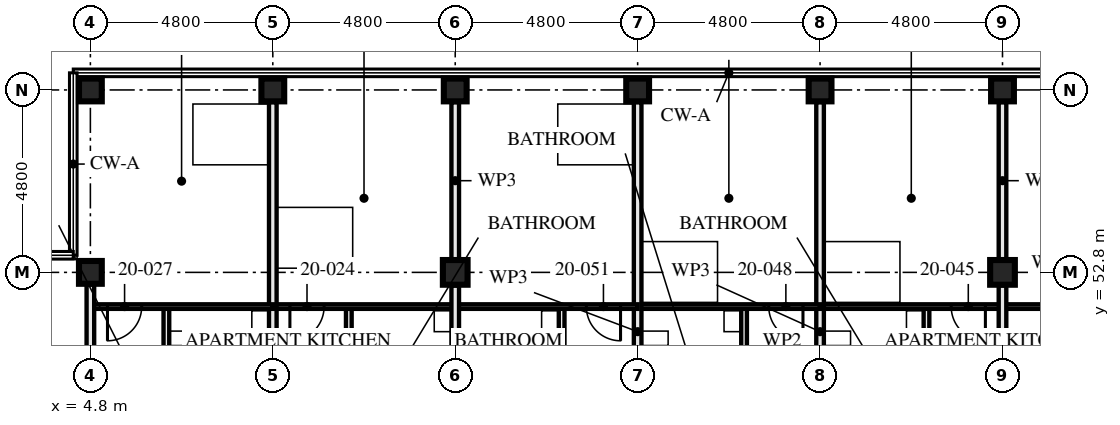
"""IFC4 building model, lengths in metres.
Left out: names, types, materials, properties, quantities, classifications, styles, units other than length and angle.
Written with IfcOpenShell. Run it as: python <this file> out.ifc"""

import sys

from ifc_helpers import new_model, si_unit, direction, frame, frame_2d, origin, origin_2d, place, context, subcontext, project, spatial, rectangle, hollow_rectangle, extrude, element, fill, save


model = new_model("IFC4")
c1 = context("Model", 3, precision=1e-05, world=origin(), true_north=direction((0.0, 1.0)))
c2 = subcontext(c1, "Body", "Model", "MODEL_VIEW")
j1 = project(units=[si_unit("LENGTHUNIT", "METRE"), si_unit("PLANEANGLEUNIT", "RADIAN")], contexts=[c1])
p1 = place(None, origin())
s1 = spatial("IfcSite", under=j1, at=p1, CompositionType="ELEMENT")
p2 = place(p1, origin())
s2 = spatial("IfcBuilding", under=s1, at=p2, CompositionType="ELEMENT")
p3 = place(p2, frame((0.0, 0.0, 76.0)))
s3 = spatial("IfcBuildingStorey", under=s2, at=p3, CompositionType="ELEMENT", Elevation=76.0)
for number, where, z_axis, x_axis in (
    (1, (4.8, 52.8, 0.0), (0.0, 0.0, 1.0), (0.0, 1.0, 0.0)),
    (2, (4.8, 57.6, 0.0), (0.0, 0.0, 1.0), (0.0, 1.0, 0.0)),
    (3, (9.6, 57.6, 0.0), (0.0, 0.0, 1.0), (0.0, 1.0, 0.0)),
):
    element("IfcColumn", number, at=place(p3, frame(where, z_axis=z_axis, x_axis=x_axis)), inside=s3, PredefinedType="COLUMN", context=c2, shape_type="SweptSolid", body=[
        extrude(hollow_rectangle(XDim=0.6, YDim=0.6, WallThickness=0.08, at=origin_2d()), origin(), (0.0, 0.0, 1.0), 3.5),
    ])
p4 = place(p3, frame((14.4, 52.8, 0.0), z_axis=(0.0, 0.0, 1.0), x_axis=(1.0, 0.0, 0.0)))
e4 = element("IfcColumn", 4, at=p4, inside=s3, PredefinedType="COLUMN", context=c2, shape_type="SweptSolid", body=[
    extrude(hollow_rectangle(XDim=0.65, YDim=0.65, WallThickness=0.05, at=origin_2d()), origin(), (0.0, 0.0, 1.0), 3.5),
])
for number, where, z_axis, x_axis in (
    (5, (14.4, 57.6, 0.0), (0.0, 0.0, 1.0), (0.0, 1.0, 0.0)),
    (6, (19.2, 57.6, 0.0), (0.0, 0.0, 1.0), (0.0, 1.0, 0.0)),
    (7, (24.0, 57.6, 0.0), (0.0, 0.0, 1.0), (0.0, 1.0, 0.0)),
):
    element("IfcColumn", number, at=place(p3, frame(where, z_axis=z_axis, x_axis=x_axis)), inside=s3, PredefinedType="COLUMN", context=c2, shape_type="SweptSolid", body=[
        extrude(hollow_rectangle(XDim=0.6, YDim=0.6, WallThickness=0.08, at=origin_2d()), origin(), (0.0, 0.0, 1.0), 3.5),
    ])
p5 = place(p3, frame((28.8, 52.8, 0.0), z_axis=(0.0, 0.0, 1.0), x_axis=(1.0, 0.0, 0.0)))
e8 = element("IfcColumn", 8, at=p5, inside=s3, PredefinedType="COLUMN", context=c2, shape_type="SweptSolid", body=[
    extrude(hollow_rectangle(XDim=0.65, YDim=0.65, WallThickness=0.05, at=origin_2d()), origin(), (0.0, 0.0, 1.0), 3.5),
])
p6 = place(p3, frame((28.8, 57.6, 0.0), z_axis=(0.0, 0.0, 1.0), x_axis=(0.0, 1.0, 0.0)))
e9 = element("IfcColumn", 9, at=p6, inside=s3, PredefinedType="COLUMN", context=c2, shape_type="SweptSolid", body=[
    extrude(hollow_rectangle(XDim=0.6, YDim=0.6, WallThickness=0.08, at=origin_2d()), origin(), (0.0, 0.0, 1.0), 3.5),
])
p7 = place(p3, frame((11.6, 51.9, 0.0), z_axis=(0.0, 0.0, 1.0), x_axis=(0.0, -1.0, 0.0)))
e10 = element("IfcWall", 10, at=p7, inside=s3, PredefinedType="PARTITIONING", context=c2, shape_type="SweptSolid", body=[
    extrude(rectangle(XDim=3.0, YDim=0.15, at=frame_2d((1.5, 0.0))), origin(), (0.0, 0.0, 1.0), 3.25),
])
p8 = place(p3, frame((14.4, 51.9, 0.0), z_axis=(0.0, 0.0, 1.0), x_axis=(-1.0, 0.0, 0.0)))
e11 = element("IfcWall", 11, at=p8, inside=s3, PredefinedType="PARTITIONING", context=c2, shape_type="SweptSolid", body=[
    extrude(rectangle(XDim=4.8, YDim=0.12, at=frame_2d((2.4, 0.0))), origin(), (0.0, 0.0, 1.0), 3.25),
])
p9 = place(p8, frame((3.45, 0.0, 0.0)))
e12 = element("IfcOpeningElement", 12, at=p9, cuts=e11, PredefinedType="OPENING", context=c2, shape_type="SweptSolid", body=[
    extrude(rectangle(XDim=0.9, YDim=2.1, at=frame_2d((0.45, 1.05))), frame((0.0, 0.071, 0.0), z_axis=(0.0, -1.0, 0.0), x_axis=(1.0, 0.0, 0.0)), (0.0, 0.0, 1.0), 0.141),
])
p10 = place(p3, frame((9.6, 57.28, 0.0), z_axis=(0.0, 0.0, 1.0), x_axis=(0.0, -1.0, 0.0)))
e13 = element("IfcWall", 13, at=p10, inside=s3, PredefinedType="PARTITIONING", context=c2, shape_type="SweptSolid", body=[
    extrude(rectangle(XDim=12.08, YDim=0.2, at=frame_2d((6.04, 0.0))), origin(), (0.0, 0.0, 1.0), 2.04),
])
p11 = place(p3, frame((6.8, 51.9, 0.0), z_axis=(0.0, 0.0, 1.0), x_axis=(0.0, -1.0, 0.0)))
e14 = element("IfcWall", 14, at=p11, inside=s3, PredefinedType="PARTITIONING", context=c2, shape_type="SweptSolid", body=[
    extrude(rectangle(XDim=3.0, YDim=0.15, at=frame_2d((1.5, 0.0))), origin(), (0.0, 0.0, 1.0), 3.25),
])
p12 = place(p3, frame((9.6, 51.9, 0.0), z_axis=(0.0, 0.0, 1.0), x_axis=(-1.0, 0.0, 0.0)))
e15 = element("IfcWall", 15, at=p12, inside=s3, PredefinedType="PARTITIONING", context=c2, shape_type="SweptSolid", body=[
    extrude(rectangle(XDim=4.8, YDim=0.12, at=frame_2d((2.4, 0.0))), origin(), (0.0, 0.0, 1.0), 3.25),
])
p13 = place(p12, frame((3.45, 0.0, 0.0)))
e16 = element("IfcOpeningElement", 16, at=p13, cuts=e15, PredefinedType="OPENING", context=c2, shape_type="SweptSolid", body=[
    extrude(rectangle(XDim=0.9, YDim=2.1, at=frame_2d((0.45, 1.05))), frame((0.0, 0.071, 0.0), z_axis=(0.0, -1.0, 0.0), x_axis=(1.0, 0.0, 0.0)), (0.0, 0.0, 1.0), 0.141),
])
p14 = place(p3, frame((4.8, 52.48, 0.0), z_axis=(0.0, 0.0, 1.0), x_axis=(0.0, -1.0, 0.0)))
e17 = element("IfcWall", 17, at=p14, inside=s3, PredefinedType="PARTITIONING", context=c2, shape_type="SweptSolid", body=[
    extrude(rectangle(XDim=7.28, YDim=0.2, at=frame_2d((3.64, 0.0))), origin(), (0.0, 0.0, 1.0), 2.04),
])
p15 = place(p3, frame((26.8, 51.9, 0.0), z_axis=(0.0, 0.0, 1.0), x_axis=(0.0, -1.0, 0.0)))
e18 = element("IfcWall", 18, at=p15, inside=s3, PredefinedType="PARTITIONING", context=c2, shape_type="SweptSolid", body=[
    extrude(rectangle(XDim=3.0, YDim=0.15, at=frame_2d((1.5, 0.0))), origin(), (0.0, 0.0, 1.0), 3.25),
])
p16 = place(p3, frame((28.8, 51.9, 0.0), z_axis=(0.0, 0.0, 1.0), x_axis=(-1.0, 0.0, 0.0)))
e19 = element("IfcWall", 19, at=p16, inside=s3, PredefinedType="PARTITIONING", context=c2, shape_type="SweptSolid", body=[
    extrude(rectangle(XDim=4.8, YDim=0.12, at=frame_2d((2.4, 0.0))), origin(), (0.0, 0.0, 1.0), 3.25),
])
p17 = place(p16, frame((0.45, 0.0, 0.0)))
e20 = element("IfcOpeningElement", 20, at=p17, cuts=e19, PredefinedType="OPENING", context=c2, shape_type="SweptSolid", body=[
    extrude(rectangle(XDim=0.9, YDim=2.1, at=frame_2d((0.45, 1.05))), frame((0.0, 0.071, 0.0), z_axis=(0.0, -1.0, 0.0), x_axis=(1.0, 0.0, 0.0)), (0.0, 0.0, 1.0), 0.141),
])
p18 = place(p3, frame((24.0, 57.28, 0.0), z_axis=(0.0, 0.0, 1.0), x_axis=(0.0, -1.0, 0.0)))
e21 = element("IfcWall", 21, at=p18, inside=s3, PredefinedType="PARTITIONING", context=c2, shape_type="SweptSolid", body=[
    extrude(rectangle(XDim=12.08, YDim=0.2, at=frame_2d((6.04, 0.0))), origin(), (0.0, 0.0, 1.0), 2.04),
])
p19 = place(p3, frame((22.0, 51.9, 0.0), z_axis=(0.0, 0.0, 1.0), x_axis=(0.0, -1.0, 0.0)))
e22 = element("IfcWall", 22, at=p19, inside=s3, PredefinedType="PARTITIONING", context=c2, shape_type="SweptSolid", body=[
    extrude(rectangle(XDim=3.0, YDim=0.15, at=frame_2d((1.5, 0.0))), origin(), (0.0, 0.0, 1.0), 3.25),
])
p20 = place(p3, frame((24.0, 51.9, 0.0), z_axis=(0.0, 0.0, 1.0), x_axis=(-1.0, 0.0, 0.0)))
e23 = element("IfcWall", 23, at=p20, inside=s3, PredefinedType="PARTITIONING", context=c2, shape_type="SweptSolid", body=[
    extrude(rectangle(XDim=4.8, YDim=0.12, at=frame_2d((2.4, 0.0))), origin(), (0.0, 0.0, 1.0), 3.25),
])
p21 = place(p20, frame((0.45, 0.0, 0.0)))
e24 = element("IfcOpeningElement", 24, at=p21, cuts=e23, PredefinedType="OPENING", context=c2, shape_type="SweptSolid", body=[
    extrude(rectangle(XDim=0.9, YDim=2.1, at=frame_2d((0.45, 1.05))), frame((0.0, 0.071, 0.0), z_axis=(0.0, -1.0, 0.0), x_axis=(1.0, 0.0, 0.0)), (0.0, 0.0, 1.0), 0.141),
])
p22 = place(p3, frame((19.2, 57.28, 0.0), z_axis=(0.0, 0.0, 1.0), x_axis=(0.0, -1.0, 0.0)))
e25 = element("IfcWall", 25, at=p22, inside=s3, PredefinedType="PARTITIONING", context=c2, shape_type="SweptSolid", body=[
    extrude(rectangle(XDim=12.08, YDim=0.2, at=frame_2d((6.04, 0.0))), origin(), (0.0, 0.0, 1.0), 2.04),
])
p23 = place(p3, frame((17.2, 51.9, 0.0), z_axis=(0.0, 0.0, 1.0), x_axis=(0.0, -1.0, 0.0)))
e26 = element("IfcWall", 26, at=p23, inside=s3, PredefinedType="PARTITIONING", context=c2, shape_type="SweptSolid", body=[
    extrude(rectangle(XDim=3.0, YDim=0.15, at=frame_2d((1.5, 0.0))), origin(), (0.0, 0.0, 1.0), 3.25),
])
p24 = place(p3, frame((19.2, 51.9, 0.0), z_axis=(0.0, 0.0, 1.0), x_axis=(-1.0, 0.0, 0.0)))
e27 = element("IfcWall", 27, at=p24, inside=s3, PredefinedType="PARTITIONING", context=c2, shape_type="SweptSolid", body=[
    extrude(rectangle(XDim=4.8, YDim=0.12, at=frame_2d((2.4, 0.0))), origin(), (0.0, 0.0, 1.0), 3.25),
])
p25 = place(p24, frame((0.45, 0.0, 0.0)))
e28 = element("IfcOpeningElement", 28, at=p25, cuts=e27, PredefinedType="OPENING", context=c2, shape_type="SweptSolid", body=[
    extrude(rectangle(XDim=0.9, YDim=2.1, at=frame_2d((0.45, 1.05))), frame((0.0, 0.071, 0.0), z_axis=(0.0, -1.0, 0.0), x_axis=(1.0, 0.0, 0.0)), (0.0, 0.0, 1.0), 0.141),
])
p26 = place(p3, frame((33.6, 51.9, 0.0), z_axis=(0.0, 0.0, 1.0), x_axis=(-1.0, 0.0, 0.0)))
e29 = element("IfcWall", 29, at=p26, inside=s3, PredefinedType="PARTITIONING", context=c2, shape_type="SweptSolid", body=[
    extrude(rectangle(XDim=4.8, YDim=0.12, at=frame_2d((2.4, 0.0))), origin(), (0.0, 0.0, 1.0), 3.25),
])
p27 = place(p26, frame((0.45, 0.0, 0.0)))
e30 = element("IfcOpeningElement", 30, at=p27, cuts=e29, PredefinedType="OPENING", context=c2, shape_type="SweptSolid", body=[
    extrude(rectangle(XDim=0.9, YDim=2.1, at=frame_2d((0.45, 1.05))), frame((0.0, 0.071, 0.0), z_axis=(0.0, -1.0, 0.0), x_axis=(1.0, 0.0, 0.0)), (0.0, 0.0, 1.0), 0.141),
])
p28 = place(p3, frame((14.4, 48.345, 0.0), z_axis=(0.0, 0.0, 1.0), x_axis=(0.0, 1.0, 0.0)))
e31 = element("IfcWall", 31, at=p28, inside=s3, PredefinedType="PARTITIONING", context=c2, shape_type="SweptSolid", body=[
    extrude(rectangle(XDim=4.11, YDim=0.2, at=frame_2d((2.055, 0.0))), origin(), (0.0, 0.0, 1.0), 2.04),
])
p29 = place(p3, frame((14.4, 53.145, 0.0), z_axis=(0.0, 0.0, 1.0), x_axis=(0.0, 1.0, 0.0)))
e32 = element("IfcWall", 32, at=p29, inside=s3, PredefinedType="PARTITIONING", context=c2, shape_type="SweptSolid", body=[
    extrude(rectangle(XDim=4.135, YDim=0.2, at=frame_2d((2.067, 0.0))), origin(), (0.0, 0.0, 1.0), 2.04),
])
p30 = place(p3, frame((28.8, 48.345, 0.0), z_axis=(0.0, 0.0, 1.0), x_axis=(0.0, 1.0, 0.0)))
e33 = element("IfcWall", 33, at=p30, inside=s3, PredefinedType="PARTITIONING", context=c2, shape_type="SweptSolid", body=[
    extrude(rectangle(XDim=4.11, YDim=0.2, at=frame_2d((2.055, 0.0))), origin(), (0.0, 0.0, 1.0), 2.04),
])
p31 = place(p3, frame((28.8, 53.145, 0.0), z_axis=(0.0, 0.0, 1.0), x_axis=(0.0, 1.0, 0.0)))
e34 = element("IfcWall", 34, at=p31, inside=s3, PredefinedType="PARTITIONING", context=c2, shape_type="SweptSolid", body=[
    extrude(rectangle(XDim=4.135, YDim=0.2, at=frame_2d((2.067, 0.0))), origin(), (0.0, 0.0, 1.0), 2.04),
])
p32 = place(p9, origin())
e35 = element("IfcDoor", 35, at=p32, inside=s3, OperationType="SINGLE_SWING_LEFT", PredefinedType="DOOR", context=c2, shape_type="SweptSolid", body=[
    extrude(rectangle(XDim=0.9, YDim=2.1, at=frame_2d((0.45, 1.05))), frame((0.0, 0.022, 0.0), z_axis=(0.0, -1.0, 0.0), x_axis=(1.0, 0.0, 0.0)), (0.0, 0.0, 1.0), 0.044),
])
fill(e12, e35)
p33 = place(p13, origin())
e36 = element("IfcDoor", 36, at=p33, inside=s3, OperationType="SINGLE_SWING_LEFT", PredefinedType="DOOR", context=c2, shape_type="SweptSolid", body=[
    extrude(rectangle(XDim=0.9, YDim=2.1, at=frame_2d((0.45, 1.05))), frame((0.0, 0.022, 0.0), z_axis=(0.0, -1.0, 0.0), x_axis=(1.0, 0.0, 0.0)), (0.0, 0.0, 1.0), 0.044),
])
fill(e16, e36)
p34 = place(p17, origin())
e37 = element("IfcDoor", 37, at=p34, inside=s3, OperationType="SINGLE_SWING_RIGHT", PredefinedType="DOOR", context=c2, shape_type="SweptSolid", body=[
    extrude(rectangle(XDim=0.9, YDim=2.1, at=frame_2d((0.45, 1.05))), frame((0.0, 0.022, 0.0), z_axis=(0.0, -1.0, 0.0), x_axis=(1.0, 0.0, 0.0)), (0.0, 0.0, 1.0), 0.044),
])
fill(e20, e37)
p35 = place(p21, origin())
e38 = element("IfcDoor", 38, at=p35, inside=s3, OperationType="SINGLE_SWING_RIGHT", PredefinedType="DOOR", context=c2, shape_type="SweptSolid", body=[
    extrude(rectangle(XDim=0.9, YDim=2.1, at=frame_2d((0.45, 1.05))), frame((0.0, 0.022, 0.0), z_axis=(0.0, -1.0, 0.0), x_axis=(1.0, 0.0, 0.0)), (0.0, 0.0, 1.0), 0.044),
])
fill(e24, e38)
p36 = place(p25, origin())
e39 = element("IfcDoor", 39, at=p36, inside=s3, OperationType="SINGLE_SWING_RIGHT", PredefinedType="DOOR", context=c2, shape_type="SweptSolid", body=[
    extrude(rectangle(XDim=0.9, YDim=2.1, at=frame_2d((0.45, 1.05))), frame((0.0, 0.022, 0.0), z_axis=(0.0, -1.0, 0.0), x_axis=(1.0, 0.0, 0.0)), (0.0, 0.0, 1.0), 0.044),
])
fill(e28, e39)
save(model, sys.argv[1])
